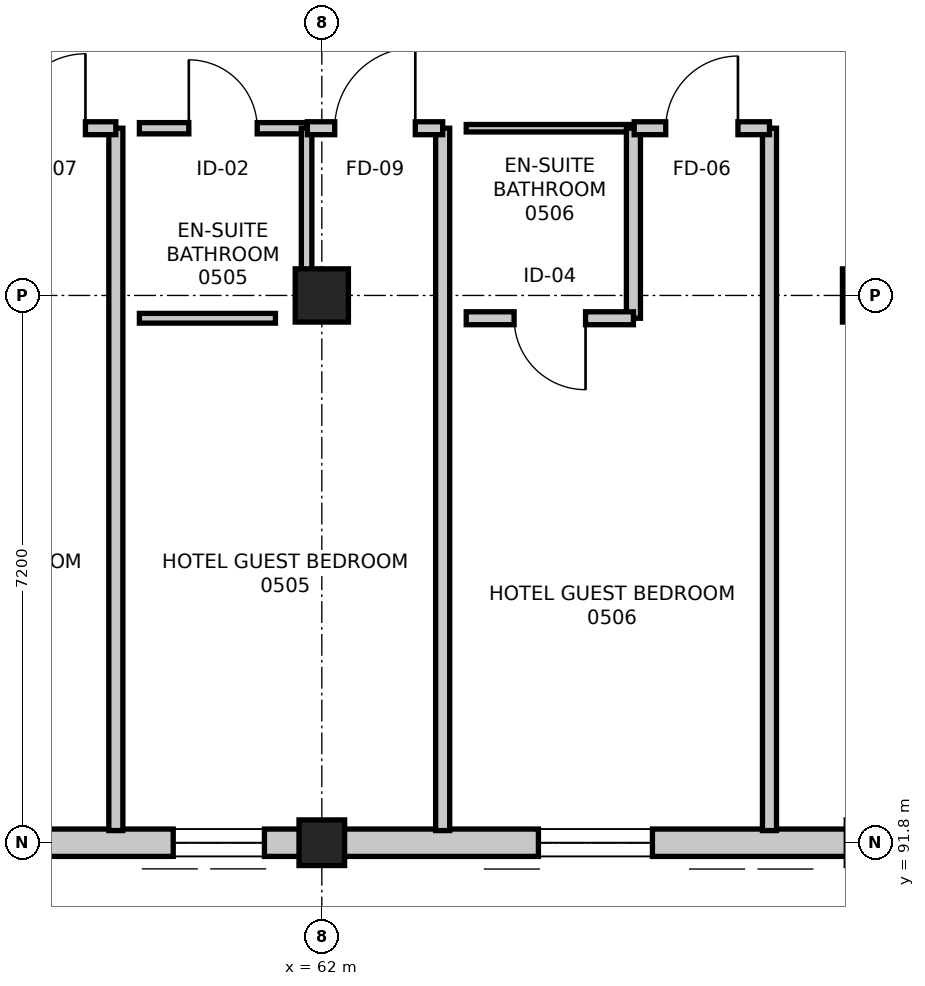
"""IFC4 building model, lengths in metres.
Left out: names, types, materials, properties, quantities, classifications, styles, units other than length and angle.
Written with IfcOpenShell. Run it as: python <this file> out.ifc"""

import sys

from ifc_helpers import new_model, si_unit, direction, frame, frame_2d, origin, origin_2d, place, context, subcontext, project, spatial, rectangle, extrude, element, fill, save


model = new_model("IFC4")
c1 = context("Model", 3, precision=1e-05, world=origin(), true_north=direction((0.0, 1.0)))
c2 = subcontext(c1, "Body", "Model", "MODEL_VIEW")
j1 = project(units=[si_unit("LENGTHUNIT", "METRE"), si_unit("PLANEANGLEUNIT", "RADIAN")], contexts=[c1])
p1 = place(None, origin())
s1 = spatial("IfcSite", under=j1, at=p1, CompositionType="ELEMENT")
p2 = place(p1, origin())
s2 = spatial("IfcBuilding", under=s1, at=p2, CompositionType="ELEMENT")
p3 = place(p2, frame((0.0, 0.0, 22.8)))
s3 = spatial("IfcBuildingStorey", under=s2, at=p3, CompositionType="ELEMENT", Elevation=22.8)
p4 = place(p3, frame((62.0, 91.8, 0.0), z_axis=(0.0, 0.0, 1.0), x_axis=(1.0, 0.0, 0.0)))
e1 = element("IfcColumn", 1, at=p4, inside=s3, PredefinedType="COLUMN", context=c2, shape_type="SweptSolid", body=[
    extrude(rectangle(XDim=0.6, YDim=0.6, at=origin_2d()), origin(), (0.0, 0.0, 1.0), 3.6),
])
for number, where, z_axis, x_axis in (
    (2, (62.0, 99.0, 0.0), (0.0, 0.0, 1.0), (1.0, 0.0, 0.0)),
    (3, (69.2, 99.0, 0.0), (0.0, 0.0, 1.0), (1.0, 0.0, 0.0)),
):
    element("IfcColumn", number, at=place(p3, frame(where, z_axis=z_axis, x_axis=x_axis)), inside=s3, PredefinedType="COLUMN", context=c2, shape_type="SweptSolid", body=[
        extrude(rectangle(XDim=0.7, YDim=0.7, at=origin_2d()), origin(), (0.0, 0.0, 1.0), 3.6),
    ])
p5 = place(p3, frame((69.2, 91.8, 0.0), z_axis=(0.0, 0.0, 1.0), x_axis=(-1.0, 0.0, 0.0)))
e4 = element("IfcWall", 4, at=p5, inside=s3, PredefinedType="STANDARD", context=c2, shape_type="SweptSolid", body=[
    extrude(rectangle(XDim=7.2, YDim=0.36, at=frame_2d((3.6, 0.0))), origin(), (0.0, 0.0, 1.0), 2.735),
])
p6 = place(p5, frame((2.85, 0.0, 0.75)))
e5 = element("IfcOpeningElement", 5, at=p6, cuts=e4, PredefinedType="OPENING", context=c2, shape_type="SweptSolid", body=[
    extrude(rectangle(XDim=1.5, YDim=1.5, at=frame_2d((0.75, 0.75))), frame((0.0, 0.19, 0.0), z_axis=(0.0, -1.0, 0.0), x_axis=(1.0, 0.0, 0.0)), (0.0, 0.0, 1.0), 0.38),
])
p7 = place(p3, frame((62.0, 91.8, 0.0), z_axis=(0.0, 0.0, 1.0), x_axis=(-1.0, 0.0, 0.0)))
e6 = element("IfcWall", 6, at=p7, inside=s3, PredefinedType="STANDARD", context=c2, shape_type="SweptSolid", body=[
    extrude(rectangle(XDim=7.2, YDim=0.36, at=frame_2d((3.6, 0.0))), origin(), (0.0, 0.0, 1.0), 2.735),
])
p8 = place(p7, frame((0.755, 0.0, 0.75)))
e7 = element("IfcOpeningElement", 7, at=p8, cuts=e6, PredefinedType="OPENING", context=c2, shape_type="SweptSolid", body=[
    extrude(rectangle(XDim=1.2, YDim=1.5, at=frame_2d((0.6, 0.75))), frame((0.0, 0.19, 0.0), z_axis=(0.0, -1.0, 0.0), x_axis=(1.0, 0.0, 0.0)), (0.0, 0.0, 1.0), 0.38),
])
p9 = place(p7, frame((4.355, 0.0, 0.75)))
e8 = element("IfcOpeningElement", 8, at=p9, cuts=e6, PredefinedType="OPENING", context=c2, shape_type="SweptSolid", body=[
    extrude(rectangle(XDim=1.2, YDim=1.5, at=frame_2d((0.6, 0.75))), frame((0.0, 0.19, 0.0), z_axis=(0.0, -1.0, 0.0), x_axis=(1.0, 0.0, 0.0)), (0.0, 0.0, 1.0), 0.38),
])
p10 = place(p3, frame((59.29, 101.2, 0.0), z_axis=(0.0, 0.0, 1.0), x_axis=(0.0, -1.0, 0.0)))
e9 = element("IfcWall", 9, at=p10, inside=s3, PredefinedType="PARTITIONING", context=c2, shape_type="SweptSolid", body=[
    extrude(rectangle(XDim=9.24, YDim=0.185, at=frame_2d((4.62, 0.0))), origin(), (0.0, 0.0, 1.0), 2.735),
])
p11 = place(p3, frame((57.51, 101.2, 0.0), z_axis=(0.0, 0.0, 1.0), x_axis=(1.0, 0.0, 0.0)))
e10 = element("IfcWall", 10, at=p11, inside=s3, PredefinedType="PARTITIONING", context=c2, shape_type="SweptSolid", body=[
    extrude(rectangle(XDim=1.78, YDim=0.17, at=frame_2d((0.89, 0.0))), origin(), (0.0, 0.0, 1.0), 3.35),
])
p12 = place(p11, frame((0.4, 0.0, 0.0)))
e11 = element("IfcOpeningElement", 11, at=p12, cuts=e10, PredefinedType="OPENING", context=c2, shape_type="SweptSolid", body=[
    extrude(rectangle(XDim=0.98, YDim=2.15, at=frame_2d((0.49, 1.075))), frame((0.0, 0.095, 0.0), z_axis=(0.0, -1.0, 0.0), x_axis=(1.0, 0.0, 0.0)), (0.0, 0.0, 1.0), 0.19),
])
p13 = place(p3, frame((59.6, 101.2, 0.0), z_axis=(0.0, 0.0, 1.0), x_axis=(1.0, 0.0, 0.0)))
e12 = element("IfcWall", 12, at=p13, inside=s3, PredefinedType="PARTITIONING", context=c2, shape_type="SweptSolid", body=[
    extrude(rectangle(XDim=2.2, YDim=0.148, at=frame_2d((1.1, 0.0))), origin(), (0.0, 0.0, 1.0), 2.685),
])
p14 = place(p13, frame((0.65, 0.0, 0.0)))
e13 = element("IfcOpeningElement", 13, at=p14, cuts=e12, PredefinedType="OPENING", context=c2, shape_type="SweptSolid", body=[
    extrude(rectangle(XDim=0.9, YDim=2.08, at=frame_2d((0.45, 1.04))), frame((0.0, 0.084, 0.0), z_axis=(0.0, -1.0, 0.0), x_axis=(1.0, 0.0, 0.0)), (0.0, 0.0, 1.0), 0.168),
])
p15 = place(p3, frame((61.8, 101.2, 0.0), z_axis=(0.0, 0.0, 1.0), x_axis=(0.0, -1.0, 0.0)))
e14 = element("IfcWall", 14, at=p15, inside=s3, PredefinedType="PARTITIONING", context=c2, shape_type="SweptSolid", body=[
    extrude(rectangle(XDim=2.09, YDim=0.138, at=frame_2d((1.045, 0.0))), origin(), (0.0, 0.0, 1.0), 2.685),
])
p16 = place(p3, frame((61.39, 98.7, 0.0), z_axis=(0.0, 0.0, 1.0), x_axis=(-1.0, 0.0, 0.0)))
e15 = element("IfcWall", 15, at=p16, inside=s3, PredefinedType="PARTITIONING", context=c2, shape_type="SweptSolid", body=[
    extrude(rectangle(XDim=1.79, YDim=0.128, at=frame_2d((0.895, 0.0))), origin(), (0.0, 0.0, 1.0), 3.35),
])
p17 = place(p3, frame((63.59, 101.2, 0.0), z_axis=(0.0, 0.0, 1.0), x_axis=(0.0, -1.0, 0.0)))
e16 = element("IfcWall", 16, at=p17, inside=s3, PredefinedType="PARTITIONING", context=c2, shape_type="SweptSolid", body=[
    extrude(rectangle(XDim=9.24, YDim=0.185, at=frame_2d((4.62, 0.0))), origin(), (0.0, 0.0, 1.0), 2.735),
])
p18 = place(p3, frame((61.81, 101.2, 0.0), z_axis=(0.0, 0.0, 1.0), x_axis=(1.0, 0.0, 0.0)))
e17 = element("IfcWall", 17, at=p18, inside=s3, PredefinedType="PARTITIONING", context=c2, shape_type="SweptSolid", body=[
    extrude(rectangle(XDim=1.78, YDim=0.17, at=frame_2d((0.89, 0.0))), origin(), (0.0, 0.0, 1.0), 2.685),
])
p19 = place(p18, frame((0.36, 0.0, 0.0)))
e18 = element("IfcOpeningElement", 18, at=p19, cuts=e17, PredefinedType="OPENING", context=c2, shape_type="SweptSolid", body=[
    extrude(rectangle(XDim=1.06, YDim=2.2, at=frame_2d((0.53, 1.1))), frame((0.0, 0.095, 0.0), z_axis=(0.0, -1.0, 0.0), x_axis=(1.0, 0.0, 0.0)), (0.0, 0.0, 1.0), 0.19),
])
p20 = place(p3, frame((63.9, 101.2, 0.0), z_axis=(0.0, 0.0, 1.0), x_axis=(1.0, 0.0, 0.0)))
e19 = element("IfcWall", 19, at=p20, inside=s3, PredefinedType="PARTITIONING", context=c2, shape_type="SweptSolid", body=[
    extrude(rectangle(XDim=2.2, YDim=0.098, at=frame_2d((1.1, 0.0))), origin(), (0.0, 0.0, 1.0), 3.35),
])
p21 = place(p3, frame((66.1, 101.2, 0.0), z_axis=(0.0, 0.0, 1.0), x_axis=(0.0, -1.0, 0.0)))
e20 = element("IfcWall", 20, at=p21, inside=s3, PredefinedType="PARTITIONING", context=c2, shape_type="SweptSolid", body=[
    extrude(rectangle(XDim=2.5, YDim=0.185, at=frame_2d((1.25, 0.0))), origin(), (0.0, 0.0, 1.0), 2.735),
])
p22 = place(p3, frame((66.1, 98.7, 0.0), z_axis=(0.0, 0.0, 1.0), x_axis=(-1.0, 0.0, 0.0)))
e21 = element("IfcWall", 21, at=p22, inside=s3, PredefinedType="PARTITIONING", context=c2, shape_type="SweptSolid", body=[
    extrude(rectangle(XDim=2.2, YDim=0.17, at=frame_2d((1.1, 0.0))), origin(), (0.0, 0.0, 1.0), 2.735),
])
p23 = place(p22, frame((0.63, 0.0, 0.0)))
e22 = element("IfcOpeningElement", 22, at=p23, cuts=e21, PredefinedType="OPENING", context=c2, shape_type="SweptSolid", body=[
    extrude(rectangle(XDim=0.94, YDim=2.12, at=frame_2d((0.47, 1.06))), frame((0.0, 0.095, 0.0), z_axis=(0.0, -1.0, 0.0), x_axis=(1.0, 0.0, 0.0)), (0.0, 0.0, 1.0), 0.19),
])
p24 = place(p3, frame((67.89, 101.2, 0.0), z_axis=(0.0, 0.0, 1.0), x_axis=(0.0, -1.0, 0.0)))
e23 = element("IfcWall", 23, at=p24, inside=s3, PredefinedType="PARTITIONING", context=c2, shape_type="SweptSolid", body=[
    extrude(rectangle(XDim=9.24, YDim=0.185, at=frame_2d((4.62, 0.0))), origin(), (0.0, 0.0, 1.0), 2.735),
])
p25 = place(p3, frame((66.11, 101.2, 0.0), z_axis=(0.0, 0.0, 1.0), x_axis=(1.0, 0.0, 0.0)))
e24 = element("IfcWall", 24, at=p25, inside=s3, PredefinedType="PARTITIONING", context=c2, shape_type="SweptSolid", body=[
    extrude(rectangle(XDim=1.78, YDim=0.17, at=frame_2d((0.89, 0.0))), origin(), (0.0, 0.0, 1.0), 3.35),
])
p26 = place(p25, frame((0.415, 0.0, 0.0)))
e25 = element("IfcOpeningElement", 25, at=p26, cuts=e24, PredefinedType="OPENING", context=c2, shape_type="SweptSolid", body=[
    extrude(rectangle(XDim=0.95, YDim=2.1, at=frame_2d((0.475, 1.05))), frame((0.0, 0.095, 0.0), z_axis=(0.0, -1.0, 0.0), x_axis=(1.0, 0.0, 0.0)), (0.0, 0.0, 1.0), 0.19),
])
p27 = place(p6, origin())
e26 = element("IfcWindow", 26, at=p27, inside=s3, PartitioningType="SINGLE_PANEL", PredefinedType="WINDOW", context=c2, shape_type="SweptSolid", body=[
    extrude(rectangle(XDim=1.5, YDim=1.5, at=frame_2d((0.75, 0.75))), frame((0.0, 0.03, 0.0), z_axis=(0.0, -1.0, 0.0), x_axis=(1.0, 0.0, 0.0)), (0.0, 0.0, 1.0), 0.06),
])
fill(e5, e26)
p28 = place(p8, origin())
e27 = element("IfcWindow", 27, at=p28, inside=s3, PartitioningType="SINGLE_PANEL", PredefinedType="WINDOW", context=c2, shape_type="SweptSolid", body=[
    extrude(rectangle(XDim=1.2, YDim=1.5, at=frame_2d((0.6, 0.75))), frame((0.0, 0.03, 0.0), z_axis=(0.0, -1.0, 0.0), x_axis=(1.0, 0.0, 0.0)), (0.0, 0.0, 1.0), 0.06),
])
fill(e7, e27)
p29 = place(p12, origin())
e28 = element("IfcDoor", 28, at=p29, inside=s3, OperationType="SINGLE_SWING_RIGHT", PredefinedType="DOOR", context=c2, shape_type="SweptSolid", body=[
    extrude(rectangle(XDim=0.98, YDim=2.15, at=frame_2d((0.49, 1.075))), frame((0.0, 0.025, 0.0), z_axis=(0.0, -1.0, 0.0), x_axis=(1.0, 0.0, 0.0)), (0.0, 0.0, 1.0), 0.05),
])
fill(e11, e28)
p30 = place(p14, origin())
e29 = element("IfcDoor", 29, at=p30, inside=s3, OperationType="SINGLE_SWING_LEFT", PredefinedType="DOOR", context=c2, shape_type="SweptSolid", body=[
    extrude(rectangle(XDim=0.9, YDim=2.08, at=frame_2d((0.45, 1.04))), frame((0.0, 0.025, 0.0), z_axis=(0.0, -1.0, 0.0), x_axis=(1.0, 0.0, 0.0)), (0.0, 0.0, 1.0), 0.05),
])
fill(e13, e29)
p31 = place(p19, origin())
e30 = element("IfcDoor", 30, at=p31, inside=s3, OperationType="SINGLE_SWING_RIGHT", PredefinedType="DOOR", context=c2, shape_type="SweptSolid", body=[
    extrude(rectangle(XDim=1.06, YDim=2.2, at=frame_2d((0.53, 1.1))), frame((0.0, 0.025, 0.0), z_axis=(0.0, -1.0, 0.0), x_axis=(1.0, 0.0, 0.0)), (0.0, 0.0, 1.0), 0.05),
])
fill(e18, e30)
p32 = place(p23, origin())
e31 = element("IfcDoor", 31, at=p32, inside=s3, OperationType="SINGLE_SWING_LEFT", PredefinedType="DOOR", context=c2, shape_type="SweptSolid", body=[
    extrude(rectangle(XDim=0.94, YDim=2.12, at=frame_2d((0.47, 1.06))), frame((0.0, 0.025, 0.0), z_axis=(0.0, -1.0, 0.0), x_axis=(1.0, 0.0, 0.0)), (0.0, 0.0, 1.0), 0.05),
])
fill(e22, e31)
p33 = place(p26, origin())
e32 = element("IfcDoor", 32, at=p33, inside=s3, OperationType="SINGLE_SWING_RIGHT", PredefinedType="DOOR", context=c2, shape_type="SweptSolid", body=[
    extrude(rectangle(XDim=0.95, YDim=2.1, at=frame_2d((0.475, 1.05))), frame((0.0, 0.025, 0.0), z_axis=(0.0, -1.0, 0.0), x_axis=(1.0, 0.0, 0.0)), (0.0, 0.0, 1.0), 0.05),
])
fill(e25, e32)
save(model, sys.argv[1])
